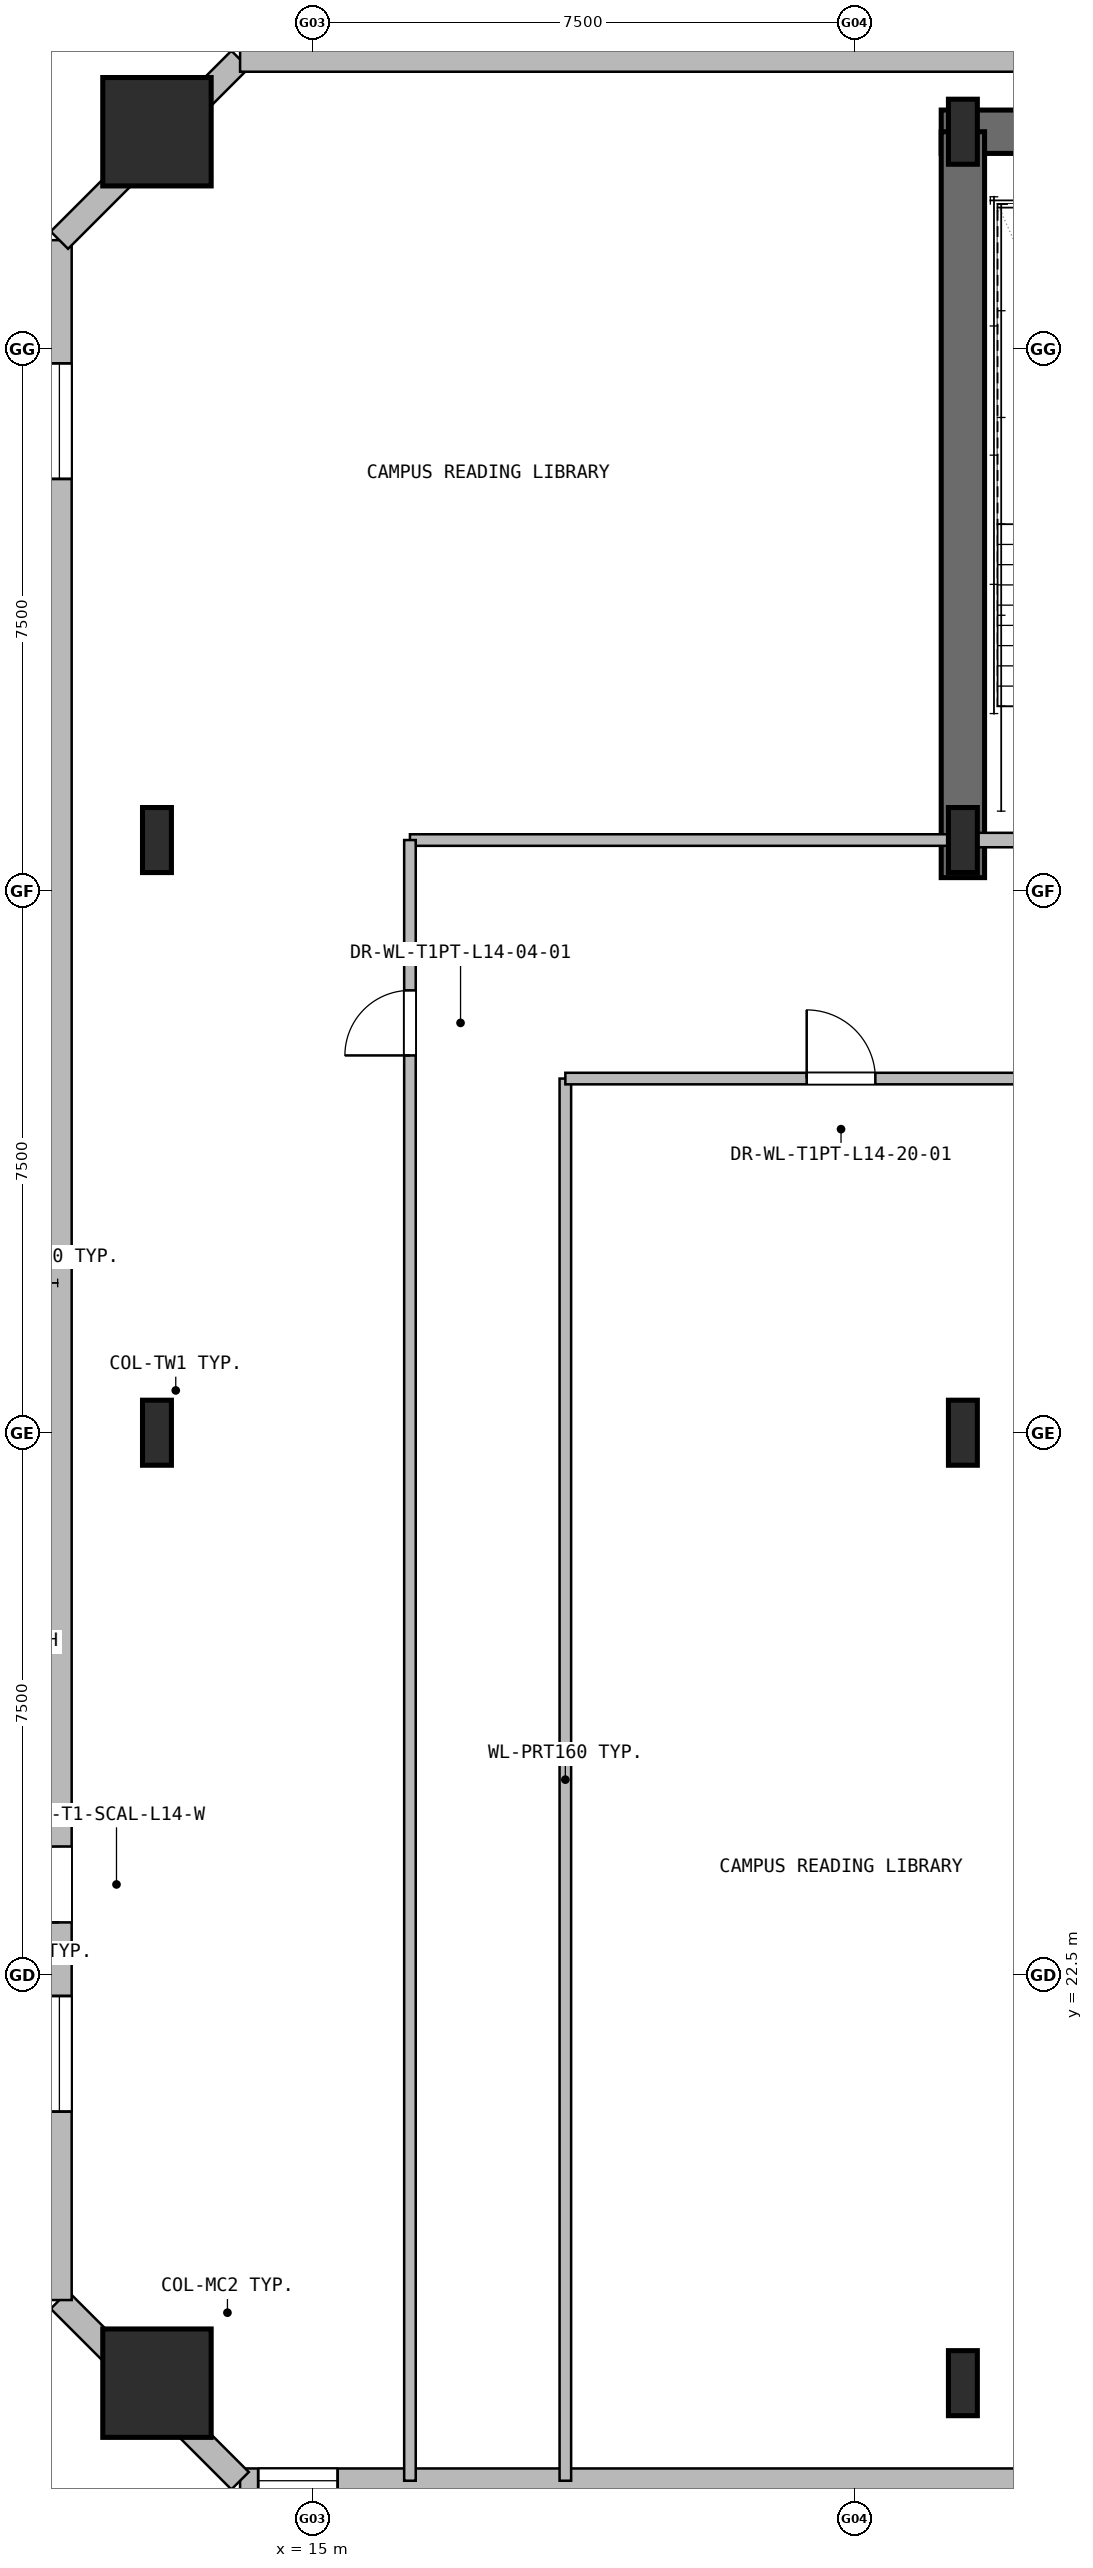
"""IFC4 building model, lengths in metres.
Left out: names, types, materials, properties, quantities, classifications, styles, units other than length and angle.
Written with IfcOpenShell. Run it as: python <this file> out.ifc"""

import sys

from ifc_helpers import new_model, si_unit, direction, frame, frame_2d, origin, origin_2d, place, context, subcontext, project, spatial, rectangle, hollow_rectangle, i_section, extrude, element, fill, save


model = new_model("IFC4")
c1 = context("Model", 3, precision=1e-05, world=origin(), true_north=direction((0.0, 1.0)))
c2 = subcontext(c1, "Body", "Model", "MODEL_VIEW")
j1 = project(units=[si_unit("LENGTHUNIT", "METRE"), si_unit("PLANEANGLEUNIT", "RADIAN")], contexts=[c1])
p1 = place(None, origin())
s1 = spatial("IfcSite", under=j1, at=p1, CompositionType="ELEMENT")
p2 = place(p1, origin())
s2 = spatial("IfcBuilding", under=s1, at=p2, CompositionType="ELEMENT")
p3 = place(p2, frame((0.0, 0.0, 57.0)))
s3 = spatial("IfcBuildingStorey", under=s2, at=p3, CompositionType="ELEMENT", Elevation=57.0)
p4 = place(p3, frame((23.7, 48.0, 0.0), z_axis=(0.0, 0.0, 1.0), x_axis=(1.0, 0.0, 0.0)))
e1 = element("IfcWall", 1, at=p4, inside=s3, PredefinedType="SHEAR", context=c2, shape_type="SweptSolid", body=[
    extrude(rectangle(XDim=27.6, YDim=0.6, at=frame_2d((13.8, 0.0))), origin(), (0.0, 0.0, 1.0), 3.3),
])
p5 = place(p3, frame((24.0, 37.68, 0.0), z_axis=(0.0, 0.0, 1.0), x_axis=(0.0, 1.0, 0.0)))
e2 = element("IfcWall", 2, at=p5, inside=s3, PredefinedType="SHEAR", context=c2, shape_type="SweptSolid", body=[
    extrude(rectangle(XDim=10.32, YDim=0.6, at=frame_2d((5.16, 0.0))), origin(), (0.0, 0.0, 1.0), 3.3),
])
p6 = place(p3, frame((12.85, 16.85, 0.0), z_axis=(0.0, 0.0, 1.0), x_axis=(1.0, 0.0, 0.0)))
e3 = element("IfcColumn", 3, at=p6, inside=s3, PredefinedType="COLUMN", context=c2, shape_type="SweptSolid", body=[
    extrude(hollow_rectangle(XDim=1.5, YDim=1.5, WallThickness=0.04, at=origin_2d()), origin(), (0.0, 0.0, 1.0), 3.3),
])
for number, where, z_axis, x_axis in (
    (4, (12.85, 30.0, 0.0), (0.0, 0.0, 1.0), (1.0, 0.0, 0.0)),
    (5, (12.85, 38.2, 0.0), (0.0, 0.0, 1.0), (1.0, 0.0, 0.0)),
):
    element("IfcColumn", number, at=place(p3, frame(where, z_axis=z_axis, x_axis=x_axis)), inside=s3, PredefinedType="COLUMN", context=c2, shape_type="SweptSolid", body=[
        extrude(i_section(OverallWidth=0.4, OverallDepth=0.9, WebThickness=0.02, FlangeThickness=0.036, at=origin_2d()), origin(), (0.0, 0.0, 1.0), 3.3),
    ])
p7 = place(p3, frame((12.85, 48.0, 0.0), z_axis=(0.0, 0.0, 1.0), x_axis=(1.0, 0.0, 0.0)))
e6 = element("IfcColumn", 6, at=p7, inside=s3, PredefinedType="COLUMN", context=c2, shape_type="SweptSolid", body=[
    extrude(hollow_rectangle(XDim=1.5, YDim=1.5, WallThickness=0.04, at=origin_2d()), origin(), (0.0, 0.0, 1.0), 3.3),
])
for number, where, z_axis, x_axis in (
    (7, (24.0, 16.85, 0.0), (0.0, 0.0, 1.0), (1.0, 0.0, 0.0)),
    (8, (24.0, 30.0, 0.0), (0.0, 0.0, 1.0), (1.0, 0.0, 0.0)),
    (9, (24.0, 38.2, 0.0), (0.0, 0.0, 1.0), (1.0, 0.0, 0.0)),
    (10, (24.0, 48.0, 0.0), (0.0, 0.0, 1.0), (1.0, 0.0, 0.0)),
):
    element("IfcColumn", number, at=place(p3, frame(where, z_axis=z_axis, x_axis=x_axis)), inside=s3, PredefinedType="COLUMN", context=c2, shape_type="SweptSolid", body=[
        extrude(i_section(OverallWidth=0.4, OverallDepth=0.9, WebThickness=0.02, FlangeThickness=0.036, at=origin_2d()), origin(), (0.0, 0.0, 1.0), 3.3),
    ])
p8 = place(p3, frame((61.0, 15.5, 0.0), z_axis=(0.0, 0.0, 1.0), x_axis=(-1.0, 0.0, 0.0)))
e11 = element("IfcWall", 11, at=p8, inside=s3, PredefinedType="SOLIDWALL", context=c2, shape_type="SweptSolid", body=[
    extrude(rectangle(XDim=47.0, YDim=0.34, at=frame_2d((23.5, 0.0))), origin(), (0.0, 0.0, 1.0), 3.03),
])
p9 = place(p8, frame((45.65, 0.0, 0.8)))
e12 = element("IfcOpeningElement", 12, at=p9, cuts=e11, PredefinedType="OPENING", context=c2, shape_type="SweptSolid", body=[
    extrude(rectangle(XDim=1.1, YDim=1.5, at=frame_2d((0.55, 0.75))), frame((0.0, 0.18, 0.0), z_axis=(0.0, -1.0, 0.0), x_axis=(1.0, 0.0, 0.0)), (0.0, 0.0, 1.0), 0.36),
])
p10 = place(p8, frame((0.25, 0.0, 0.8)))
e13 = element("IfcOpeningElement", 13, at=p10, cuts=e11, PredefinedType="OPENING", context=c2, shape_type="SweptSolid", body=[
    extrude(rectangle(XDim=1.1, YDim=1.5, at=frame_2d((0.55, 0.75))), frame((0.0, 0.18, 0.0), z_axis=(0.0, -1.0, 0.0), x_axis=(1.0, 0.0, 0.0)), (0.0, 0.0, 1.0), 0.36),
])
p11 = place(p8, frame((33.896, 0.0, 0.8)))
e14 = element("IfcOpeningElement", 14, at=p11, cuts=e11, PredefinedType="OPENING", context=c2, shape_type="SweptSolid", body=[
    extrude(rectangle(XDim=1.75, YDim=1.8, at=frame_2d((0.875, 0.9))), frame((0.0, 0.18, 0.0), z_axis=(0.0, -1.0, 0.0), x_axis=(1.0, 0.0, 0.0)), (0.0, 0.0, 1.0), 0.36),
])
p12 = place(p8, frame((12.14, 0.0, 0.8)))
e15 = element("IfcOpeningElement", 15, at=p12, cuts=e11, PredefinedType="OPENING", context=c2, shape_type="SweptSolid", body=[
    extrude(rectangle(XDim=1.75, YDim=1.8, at=frame_2d((0.875, 0.9))), frame((0.0, 0.18, 0.0), z_axis=(0.0, -1.0, 0.0), x_axis=(1.0, 0.0, 0.0)), (0.0, 0.0, 1.0), 0.36),
])
p13 = place(p8, frame((5.49, 0.0, 0.8)))
e16 = element("IfcOpeningElement", 16, at=p13, cuts=e11, PredefinedType="OPENING", context=c2, shape_type="SweptSolid", body=[
    extrude(rectangle(XDim=1.75, YDim=1.8, at=frame_2d((0.875, 0.9))), frame((0.0, 0.18, 0.0), z_axis=(0.0, -1.0, 0.0), x_axis=(1.0, 0.0, 0.0)), (0.0, 0.0, 1.0), 0.36),
])
p14 = place(p3, frame((14.0, 15.5, 0.0), z_axis=(0.0, 0.0, 1.0), x_axis=(-0.707106781187, 0.707106781187, 0.0)))
e17 = element("IfcWall", 17, at=p14, inside=s3, PredefinedType="SOLIDWALL", context=c2, shape_type="SweptSolid", body=[
    extrude(rectangle(XDim=3.536, YDim=0.34, at=frame_2d((1.768, 0.0))), origin(), (0.0, 0.0, 1.0), 3.03),
])
p15 = place(p3, frame((11.5, 18.0, 0.0), z_axis=(0.0, 0.0, 1.0), x_axis=(0.0, 1.0, 0.0)))
e18 = element("IfcWall", 18, at=p15, inside=s3, PredefinedType="SOLIDWALL", context=c2, shape_type="SweptSolid", body=[
    extrude(rectangle(XDim=28.5, YDim=0.34, at=frame_2d((14.25, 0.0))), origin(), (0.0, 0.0, 1.0), 3.03),
])
p16 = place(p15, frame((5.225, 0.0, 0.0)))
e19 = element("IfcOpeningElement", 19, at=p16, cuts=e18, PredefinedType="OPENING", context=c2, shape_type="SweptSolid", body=[
    extrude(rectangle(XDim=1.05, YDim=2.1, at=frame_2d((0.525, 1.05))), frame((0.0, 0.18, 0.0), z_axis=(0.0, -1.0, 0.0), x_axis=(1.0, 0.0, 0.0)), (0.0, 0.0, 1.0), 0.36),
])
p17 = place(p15, frame((2.607, 0.0, 0.8)))
e20 = element("IfcOpeningElement", 20, at=p17, cuts=e18, PredefinedType="OPENING", context=c2, shape_type="SweptSolid", body=[
    extrude(rectangle(XDim=1.6, YDim=1.8, at=frame_2d((0.8, 0.9))), frame((0.0, 0.18, 0.0), z_axis=(0.0, -1.0, 0.0), x_axis=(1.0, 0.0, 0.0)), (0.0, 0.0, 1.0), 0.36),
])
p18 = place(p15, frame((25.196, 0.0, 0.8)))
e21 = element("IfcOpeningElement", 21, at=p18, cuts=e18, PredefinedType="OPENING", context=c2, shape_type="SweptSolid", body=[
    extrude(rectangle(XDim=1.6, YDim=1.8, at=frame_2d((0.8, 0.9))), frame((0.0, 0.18, 0.0), z_axis=(0.0, -1.0, 0.0), x_axis=(1.0, 0.0, 0.0)), (0.0, 0.0, 1.0), 0.36),
])
p19 = place(p3, frame((11.5, 46.5, 0.0), z_axis=(0.0, 0.0, 1.0), x_axis=(0.707106781187, 0.707106781187, 0.0)))
e22 = element("IfcWall", 22, at=p19, inside=s3, PredefinedType="SOLIDWALL", context=c2, shape_type="SweptSolid", body=[
    extrude(rectangle(XDim=3.536, YDim=0.34, at=frame_2d((1.768, 0.0))), origin(), (0.0, 0.0, 1.0), 3.03),
])
p20 = place(p3, frame((14.0, 49.0, 0.0), z_axis=(0.0, 0.0, 1.0), x_axis=(1.0, 0.0, 0.0)))
e23 = element("IfcWall", 23, at=p20, inside=s3, PredefinedType="SOLIDWALL", context=c2, shape_type="SweptSolid", body=[
    extrude(rectangle(XDim=47.0, YDim=0.34, at=frame_2d((23.5, 0.0))), origin(), (0.0, 0.0, 1.0), 3.03),
])
p21 = place(p3, frame((24.0, 38.2, 0.0), z_axis=(0.0, 0.0, 1.0), x_axis=(1.0, 0.0, 0.0)))
e24 = element("IfcWall", 24, at=p21, inside=s3, PredefinedType="PARTITIONING", context=c2, shape_type="SweptSolid", body=[
    extrude(rectangle(XDim=3.95, YDim=0.2, at=frame_2d((1.975, 0.0))), origin(), (0.0, 0.0, 1.0), 2.33),
])
p22 = place(p21, frame((2.05, 0.0, 0.0)))
e25 = element("IfcOpeningElement", 25, at=p22, cuts=e24, PredefinedType="OPENING", context=c2, shape_type="SweptSolid", body=[
    extrude(rectangle(XDim=1.12, YDim=2.1, at=frame_2d((0.56, 1.05))), frame((0.0, 0.11, 0.0), z_axis=(0.0, -1.0, 0.0), x_axis=(1.0, 0.0, 0.0)), (0.0, 0.0, 1.0), 0.22),
])
p23 = place(p3, frame((18.5, 15.5, 0.0), z_axis=(0.0, 0.0, 1.0), x_axis=(0.0, 1.0, 0.0)))
e26 = element("IfcWall", 26, at=p23, inside=s3, PredefinedType="PARTITIONING", context=c2, shape_type="SweptSolid", body=[
    extrude(rectangle(XDim=19.4, YDim=0.16, at=frame_2d((9.7, 0.0))), origin(), (0.0, 0.0, 1.0), 3.03),
])
p24 = place(p3, frame((16.35, 38.2, 0.0), z_axis=(0.0, 0.0, 1.0), x_axis=(1.0, 0.0, 0.0)))
e27 = element("IfcWall", 27, at=p24, inside=s3, PredefinedType="PARTITIONING", context=c2, shape_type="SweptSolid", body=[
    extrude(rectangle(XDim=7.65, YDim=0.16, at=frame_2d((3.825, 0.0))), origin(), (0.0, 0.0, 1.0), 2.33),
])
p25 = place(p3, frame((16.35, 15.5, 0.0), z_axis=(0.0, 0.0, 1.0), x_axis=(0.0, 1.0, 0.0)))
e28 = element("IfcWall", 28, at=p25, inside=s3, PredefinedType="PARTITIONING", context=c2, shape_type="SweptSolid", body=[
    extrude(rectangle(XDim=22.7, YDim=0.16, at=frame_2d((11.35, 0.0))), origin(), (0.0, 0.0, 1.0), 3.03),
])
p26 = place(p25, frame((19.72, 0.0, 0.0)))
e29 = element("IfcOpeningElement", 29, at=p26, cuts=e28, PredefinedType="OPENING", context=c2, shape_type="SweptSolid", body=[
    extrude(rectangle(XDim=0.9, YDim=2.05, at=frame_2d((0.45, 1.025))), frame((0.0, 0.09, 0.0), z_axis=(0.0, -1.0, 0.0), x_axis=(1.0, 0.0, 0.0)), (0.0, 0.0, 1.0), 0.18),
])
p27 = place(p3, frame((18.5, 34.9, 0.0), z_axis=(0.0, 0.0, 1.0), x_axis=(1.0, 0.0, 0.0)))
e30 = element("IfcWall", 30, at=p27, inside=s3, PredefinedType="PARTITIONING", context=c2, shape_type="SweptSolid", body=[
    extrude(rectangle(XDim=40.15, YDim=0.16, at=frame_2d((20.075, 0.0))), origin(), (0.0, 0.0, 1.0), 3.03),
])
p28 = place(p27, frame((3.339, 0.0, 0.0)))
e31 = element("IfcOpeningElement", 31, at=p28, cuts=e30, PredefinedType="OPENING", context=c2, shape_type="SweptSolid", body=[
    extrude(rectangle(XDim=0.95, YDim=2.1, at=frame_2d((0.475, 1.05))), frame((0.0, 0.09, 0.0), z_axis=(0.0, -1.0, 0.0), x_axis=(1.0, 0.0, 0.0)), (0.0, 0.0, 1.0), 0.18),
])
p29 = place(p27, frame((11.193, 0.0, 0.0)))
e32 = element("IfcOpeningElement", 32, at=p29, cuts=e30, PredefinedType="OPENING", context=c2, shape_type="SweptSolid", body=[
    extrude(rectangle(XDim=0.9, YDim=2.05, at=frame_2d((0.45, 1.025))), frame((0.0, 0.09, 0.0), z_axis=(0.0, -1.0, 0.0), x_axis=(1.0, 0.0, 0.0)), (0.0, 0.0, 1.0), 0.18),
])
p30 = place(p27, frame((19.424, 0.0, 0.0)))
e33 = element("IfcOpeningElement", 33, at=p30, cuts=e30, PredefinedType="OPENING", context=c2, shape_type="SweptSolid", body=[
    extrude(rectangle(XDim=0.9, YDim=2.05, at=frame_2d((0.45, 1.025))), frame((0.0, 0.09, 0.0), z_axis=(0.0, -1.0, 0.0), x_axis=(1.0, 0.0, 0.0)), (0.0, 0.0, 1.0), 0.18),
])
p31 = place(p27, frame((24.89, 0.0, 0.0)))
e34 = element("IfcOpeningElement", 34, at=p31, cuts=e30, PredefinedType="OPENING", context=c2, shape_type="SweptSolid", body=[
    extrude(rectangle(XDim=0.85, YDim=2.05, at=frame_2d((0.425, 1.025))), frame((0.0, 0.09, 0.0), z_axis=(0.0, -1.0, 0.0), x_axis=(1.0, 0.0, 0.0)), (0.0, 0.0, 1.0), 0.18),
])
p32 = place(p27, frame((28.88, 0.0, 0.0)))
e35 = element("IfcOpeningElement", 35, at=p32, cuts=e30, PredefinedType="OPENING", context=c2, shape_type="SweptSolid", body=[
    extrude(rectangle(XDim=0.9, YDim=2.05, at=frame_2d((0.45, 1.025))), frame((0.0, 0.09, 0.0), z_axis=(0.0, -1.0, 0.0), x_axis=(1.0, 0.0, 0.0)), (0.0, 0.0, 1.0), 0.18),
])
p33 = place(p27, frame((34.82, 0.0, 0.0)))
e36 = element("IfcOpeningElement", 36, at=p33, cuts=e30, PredefinedType="OPENING", context=c2, shape_type="SweptSolid", body=[
    extrude(rectangle(XDim=0.85, YDim=2.05, at=frame_2d((0.425, 1.025))), frame((0.0, 0.09, 0.0), z_axis=(0.0, -1.0, 0.0), x_axis=(1.0, 0.0, 0.0)), (0.0, 0.0, 1.0), 0.18),
])
p34 = place(p27, frame((38.81, 0.0, 0.0)))
e37 = element("IfcOpeningElement", 37, at=p34, cuts=e30, PredefinedType="OPENING", context=c2, shape_type="SweptSolid", body=[
    extrude(rectangle(XDim=0.9, YDim=2.05, at=frame_2d((0.45, 1.025))), frame((0.0, 0.09, 0.0), z_axis=(0.0, -1.0, 0.0), x_axis=(1.0, 0.0, 0.0)), (0.0, 0.0, 1.0), 0.18),
])
p35 = place(p9, origin())
e38 = element("IfcWindow", 38, at=p35, inside=s3, PartitioningType="SINGLE_PANEL", PredefinedType="WINDOW", context=c2, shape_type="SweptSolid", body=[
    extrude(rectangle(XDim=1.1, YDim=1.5, at=frame_2d((0.55, 0.75))), frame((0.0, 0.03, 0.0), z_axis=(0.0, -1.0, 0.0), x_axis=(1.0, 0.0, 0.0)), (0.0, 0.0, 1.0), 0.06),
])
fill(e12, e38)
p36 = place(p16, origin())
e39 = element("IfcDoor", 39, at=p36, inside=s3, OperationType="SINGLE_SWING_RIGHT", PredefinedType="DOOR", context=c2, shape_type="SweptSolid", body=[
    extrude(rectangle(XDim=1.05, YDim=2.1, at=frame_2d((0.525, 1.05))), frame((0.0, 0.025, 0.0), z_axis=(0.0, -1.0, 0.0), x_axis=(1.0, 0.0, 0.0)), (0.0, 0.0, 1.0), 0.05),
])
fill(e19, e39)
p37 = place(p17, origin())
e40 = element("IfcWindow", 40, at=p37, inside=s3, PartitioningType="SINGLE_PANEL", PredefinedType="WINDOW", context=c2, shape_type="SweptSolid", body=[
    extrude(rectangle(XDim=1.6, YDim=1.8, at=frame_2d((0.8, 0.9))), frame((0.0, 0.03, 0.0), z_axis=(0.0, -1.0, 0.0), x_axis=(1.0, 0.0, 0.0)), (0.0, 0.0, 1.0), 0.06),
])
fill(e20, e40)
p38 = place(p18, origin())
e41 = element("IfcWindow", 41, at=p38, inside=s3, PartitioningType="SINGLE_PANEL", PredefinedType="WINDOW", context=c2, shape_type="SweptSolid", body=[
    extrude(rectangle(XDim=1.6, YDim=1.8, at=frame_2d((0.8, 0.9))), frame((0.0, 0.03, 0.0), z_axis=(0.0, -1.0, 0.0), x_axis=(1.0, 0.0, 0.0)), (0.0, 0.0, 1.0), 0.06),
])
fill(e21, e41)
p39 = place(p26, origin())
e42 = element("IfcDoor", 42, at=p39, inside=s3, OperationType="SINGLE_SWING_RIGHT", PredefinedType="DOOR", context=c2, shape_type="SweptSolid", body=[
    extrude(rectangle(XDim=0.9, YDim=2.05, at=frame_2d((0.45, 1.025))), frame((0.0, 0.025, 0.0), z_axis=(0.0, -1.0, 0.0), x_axis=(1.0, 0.0, 0.0)), (0.0, 0.0, 1.0), 0.05),
])
fill(e29, e42)
p40 = place(p28, origin())
e43 = element("IfcDoor", 43, at=p40, inside=s3, OperationType="SINGLE_SWING_RIGHT", PredefinedType="DOOR", context=c2, shape_type="SweptSolid", body=[
    extrude(rectangle(XDim=0.95, YDim=2.1, at=frame_2d((0.475, 1.05))), frame((0.0, 0.025, 0.0), z_axis=(0.0, -1.0, 0.0), x_axis=(1.0, 0.0, 0.0)), (0.0, 0.0, 1.0), 0.05),
])
fill(e31, e43)
save(model, sys.argv[1])
